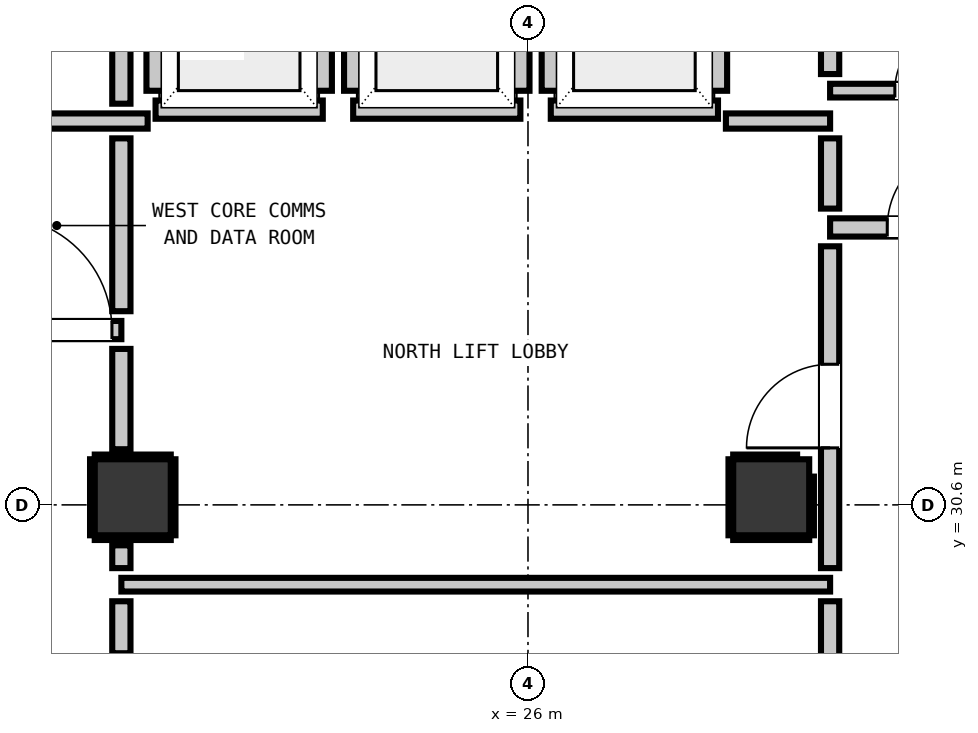
"""IFC4 building model, lengths in metres.
Left out: names, types, materials, properties, quantities, classifications, styles, units other than length and angle.
Written with IfcOpenShell. Run it as: python <this file> out.ifc"""

import sys

from ifc_helpers import new_model, si_unit, direction, frame, frame_2d, origin, origin_2d, place, context, subcontext, project, spatial, rectangle, extrude, element, fill, save


model = new_model("IFC4")
c1 = context("Model", 3, precision=1e-05, world=origin(), true_north=direction((0.0, 1.0)))
c2 = subcontext(c1, "Body", "Model", "MODEL_VIEW")
j1 = project(units=[si_unit("LENGTHUNIT", "METRE"), si_unit("PLANEANGLEUNIT", "RADIAN")], contexts=[c1])
p1 = place(None, origin())
s1 = spatial("IfcSite", under=j1, at=p1, CompositionType="ELEMENT")
p2 = place(p1, origin())
s2 = spatial("IfcBuilding", under=s1, at=p2, CompositionType="ELEMENT")
p3 = place(p2, frame((0.0, 0.0, 31.96)))
s3 = spatial("IfcBuildingStorey", under=s2, at=p3, CompositionType="ELEMENT", Elevation=31.96)
for number, where, z_axis, x_axis in (
    (1, (20.8, 30.7, 0.0), (0.0, 0.0, 1.0), (1.0, 0.0, 0.0)),
    (2, (29.2, 30.7, 0.0), (0.0, 0.0, 1.0), (1.0, 0.0, 0.0)),
):
    element("IfcColumn", number, at=place(p3, frame(where, z_axis=z_axis, x_axis=x_axis)), inside=s3, PredefinedType="COLUMN", context=c2, shape_type="SweptSolid", body=[
        extrude(rectangle(XDim=1.0, YDim=1.0, at=origin_2d()), origin(), (0.0, 0.0, 1.0), 3.32),
    ])
p4 = place(p3, frame((21.1, 35.8, 0.0), z_axis=(0.0, 0.0, 1.0), x_axis=(1.0, 0.0, 0.0)))
e3 = element("IfcWall", 3, at=p4, inside=s3, PredefinedType="PARTITIONING", context=c2, shape_type="SweptSolid", body=[
    extrude(rectangle(XDim=2.2, YDim=0.24, at=frame_2d((1.1, 0.0))), origin(), (0.0, 0.0, 1.0), 3.06),
])
p5 = place(p3, frame((21.1, 36.048, 0.0), z_axis=(0.0, 0.0, 1.0), x_axis=(0.0, 1.0, 0.0)))
e4 = element("IfcWall", 4, at=p5, inside=s3, PredefinedType="PARTITIONING", context=c2, shape_type="SweptSolid", body=[
    extrude(rectangle(XDim=2.104, YDim=0.24, at=frame_2d((1.052, 0.0))), origin(), (0.0, 0.0, 1.0), 2.295),
])
p6 = place(p3, frame((23.3, 36.048, 0.0), z_axis=(0.0, 0.0, 1.0), x_axis=(0.0, 1.0, 0.0)))
e5 = element("IfcWall", 5, at=p6, inside=s3, PredefinedType="PARTITIONING", context=c2, shape_type="SweptSolid", body=[
    extrude(rectangle(XDim=2.104, YDim=0.24, at=frame_2d((1.052, 0.0))), origin(), (0.0, 0.0, 1.0), 3.06),
])
p7 = place(p3, frame((23.7, 35.8, 0.0), z_axis=(0.0, 0.0, 1.0), x_axis=(1.0, 0.0, 0.0)))
e6 = element("IfcWall", 6, at=p7, inside=s3, PredefinedType="PARTITIONING", context=c2, shape_type="SweptSolid", body=[
    extrude(rectangle(XDim=2.2, YDim=0.24, at=frame_2d((1.1, 0.0))), origin(), (0.0, 0.0, 1.0), 3.06),
])
for number, where, z_axis, x_axis in (
    (7, (23.7, 36.048, 0.0), (0.0, 0.0, 1.0), (0.0, 1.0, 0.0)),
    (8, (25.9, 36.048, 0.0), (0.0, 0.0, 1.0), (0.0, 1.0, 0.0)),
):
    element("IfcWall", number, at=place(p3, frame(where, z_axis=z_axis, x_axis=x_axis)), inside=s3, PredefinedType="PARTITIONING", context=c2, shape_type="SweptSolid", body=[
        extrude(rectangle(XDim=2.104, YDim=0.24, at=frame_2d((1.052, 0.0))), origin(), (0.0, 0.0, 1.0), 3.06),
    ])
p8 = place(p3, frame((26.3, 35.8, 0.0), z_axis=(0.0, 0.0, 1.0), x_axis=(1.0, 0.0, 0.0)))
e9 = element("IfcWall", 9, at=p8, inside=s3, PredefinedType="PARTITIONING", context=c2, shape_type="SweptSolid", body=[
    extrude(rectangle(XDim=2.2, YDim=0.24, at=frame_2d((1.1, 0.0))), origin(), (0.0, 0.0, 1.0), 3.06),
])
for number, where, z_axis, x_axis in (
    (10, (26.3, 36.048, 0.0), (0.0, 0.0, 1.0), (0.0, 1.0, 0.0)),
    (11, (28.5, 36.048, 0.0), (0.0, 0.0, 1.0), (0.0, 1.0, 0.0)),
):
    element("IfcWall", number, at=place(p3, frame(where, z_axis=z_axis, x_axis=x_axis)), inside=s3, PredefinedType="PARTITIONING", context=c2, shape_type="SweptSolid", body=[
        extrude(rectangle(XDim=2.104, YDim=0.24, at=frame_2d((1.052, 0.0))), origin(), (0.0, 0.0, 1.0), 3.06),
    ])
p9 = place(p3, frame((17.45, 32.9, 0.0), z_axis=(0.0, 0.0, 1.0), x_axis=(1.0, 0.0, 0.0)))
e12 = element("IfcWall", 12, at=p9, inside=s3, PredefinedType="PARTITIONING", context=c2, shape_type="SweptSolid", body=[
    extrude(rectangle(XDim=3.2, YDim=0.24, at=frame_2d((1.6, 0.0))), origin(), (0.0, 0.0, 1.0), 3.06),
])
p10 = place(p9, frame((0.159, 0.0, 0.0)))
e13 = element("IfcOpeningElement", 13, at=p10, cuts=e12, PredefinedType="OPENING", context=c2, shape_type="SweptSolid", body=[
    extrude(rectangle(XDim=1.1, YDim=2.15, at=frame_2d((0.55, 1.075))), frame((0.0, 0.13, 0.0), z_axis=(0.0, -1.0, 0.0), x_axis=(1.0, 0.0, 0.0)), (0.0, 0.0, 1.0), 0.26),
])
p11 = place(p9, frame((1.576, 0.0, 0.0)))
e14 = element("IfcOpeningElement", 14, at=p11, cuts=e12, PredefinedType="OPENING", context=c2, shape_type="SweptSolid", body=[
    extrude(rectangle(XDim=1.5, YDim=2.15, at=frame_2d((0.75, 1.075))), frame((0.0, 0.13, 0.0), z_axis=(0.0, -1.0, 0.0), x_axis=(1.0, 0.0, 0.0)), (0.0, 0.0, 1.0), 0.26),
])
p12 = place(p3, frame((29.975, 34.25, 0.0), z_axis=(0.0, 0.0, 1.0), x_axis=(1.0, 0.0, 0.0)))
e15 = element("IfcWall", 15, at=p12, inside=s3, PredefinedType="PARTITIONING", context=c2, shape_type="SweptSolid", body=[
    extrude(rectangle(XDim=2.475, YDim=0.24, at=frame_2d((1.237, 0.0))), origin(), (0.0, 0.0, 1.0), 3.06),
])
p13 = place(p12, frame((0.752, 0.0, 0.0)))
e16 = element("IfcOpeningElement", 16, at=p13, cuts=e15, PredefinedType="OPENING", context=c2, shape_type="SweptSolid", body=[
    extrude(rectangle(XDim=1.1, YDim=2.15, at=frame_2d((0.55, 1.075))), frame((0.0, 0.13, 0.0), z_axis=(0.0, -1.0, 0.0), x_axis=(1.0, 0.0, 0.0)), (0.0, 0.0, 1.0), 0.26),
])
p14 = place(p3, frame((18.95, 35.65, 0.0), z_axis=(0.0, 0.0, 1.0), x_axis=(1.0, 0.0, 0.0)))
e17 = element("IfcWall", 17, at=p14, inside=s3, PredefinedType="PARTITIONING", context=c2, shape_type="SweptSolid", body=[
    extrude(rectangle(XDim=2.046, YDim=0.2, at=frame_2d((1.023, 0.0))), origin(), (0.0, 0.0, 1.0), 3.06),
])
p15 = place(p3, frame((28.604, 35.65, 0.0), z_axis=(0.0, 0.0, 1.0), x_axis=(1.0, 0.0, 0.0)))
e18 = element("IfcWall", 18, at=p15, inside=s3, PredefinedType="PARTITIONING", context=c2, shape_type="SweptSolid", body=[
    extrude(rectangle(XDim=1.371, YDim=0.2, at=frame_2d((0.686, 0.0))), origin(), (0.0, 0.0, 1.0), 3.06),
])
p16 = place(p3, frame((20.65, 29.55, 0.0), z_axis=(0.0, 0.0, 1.0), x_axis=(1.0, 0.0, 0.0)))
e19 = element("IfcWall", 19, at=p16, inside=s3, PredefinedType="PARTITIONING", context=c2, shape_type="SweptSolid", body=[
    extrude(rectangle(XDim=9.325, YDim=0.18, at=frame_2d((4.663, 0.0))), origin(), (0.0, 0.0, 1.0), 3.06),
])
p17 = place(p3, frame((29.975, 36.05, 0.0), z_axis=(0.0, 0.0, 1.0), x_axis=(1.0, 0.0, 0.0)))
e20 = element("IfcWall", 20, at=p17, inside=s3, PredefinedType="PARTITIONING", context=c2, shape_type="SweptSolid", body=[
    extrude(rectangle(XDim=2.505, YDim=0.18, at=frame_2d((1.252, 0.0))), origin(), (0.0, 0.0, 1.0), 3.06),
])
p18 = place(p17, frame((0.852, 0.0, 0.0)))
e21 = element("IfcOpeningElement", 21, at=p18, cuts=e20, PredefinedType="OPENING", context=c2, shape_type="SweptSolid", body=[
    extrude(rectangle(XDim=0.9, YDim=2.1, at=frame_2d((0.45, 1.05))), frame((0.0, 0.1, 0.0), z_axis=(0.0, -1.0, 0.0), x_axis=(1.0, 0.0, 0.0)), (0.0, 0.0, 1.0), 0.2),
])
p19 = place(p3, frame((20.65, 28.648, 0.0), z_axis=(0.0, 0.0, 1.0), x_axis=(0.0, 1.0, 0.0)))
e22 = element("IfcWall", 22, at=p19, inside=s3, PredefinedType="PARTITIONING", context=c2, shape_type="SweptSolid", body=[
    extrude(rectangle(XDim=0.684, YDim=0.24, at=frame_2d((0.342, 0.0))), origin(), (0.0, 0.0, 1.0), 2.295),
])
p20 = place(p3, frame((20.65, 29.768, 0.0), z_axis=(0.0, 0.0, 1.0), x_axis=(0.0, 1.0, 0.0)))
e23 = element("IfcWall", 23, at=p20, inside=s3, PredefinedType="PARTITIONING", context=c2, shape_type="SweptSolid", body=[
    extrude(rectangle(XDim=0.3, YDim=0.24, at=frame_2d((0.15, 0.0))), origin(), (0.0, 0.0, 1.0), 2.295),
])
p21 = place(p3, frame((20.65, 31.332, 0.0), z_axis=(0.0, 0.0, 1.0), x_axis=(0.0, 1.0, 0.0)))
e24 = element("IfcWall", 24, at=p21, inside=s3, PredefinedType="PARTITIONING", context=c2, shape_type="SweptSolid", body=[
    extrude(rectangle(XDim=1.32, YDim=0.24, at=frame_2d((0.66, 0.0))), origin(), (0.0, 0.0, 1.0), 2.295),
])
p22 = place(p3, frame((20.65, 33.148, 0.0), z_axis=(0.0, 0.0, 1.0), x_axis=(0.0, 1.0, 0.0)))
e25 = element("IfcWall", 25, at=p22, inside=s3, PredefinedType="PARTITIONING", context=c2, shape_type="SweptSolid", body=[
    extrude(rectangle(XDim=2.274, YDim=0.24, at=frame_2d((1.137, 0.0))), origin(), (0.0, 0.0, 1.0), 2.295),
])
p23 = place(p3, frame((20.65, 35.878, 0.0), z_axis=(0.0, 0.0, 1.0), x_axis=(0.0, 1.0, 0.0)))
e26 = element("IfcWall", 26, at=p23, inside=s3, PredefinedType="PARTITIONING", context=c2, shape_type="SweptSolid", body=[
    extrude(rectangle(XDim=2.674, YDim=0.24, at=frame_2d((1.337, 0.0))), origin(), (0.0, 0.0, 1.0), 2.295),
])
p24 = place(p3, frame((29.975, 25.648, 0.0), z_axis=(0.0, 0.0, 1.0), x_axis=(0.0, 1.0, 0.0)))
e27 = element("IfcWall", 27, at=p24, inside=s3, PredefinedType="PARTITIONING", context=c2, shape_type="SweptSolid", body=[
    extrude(rectangle(XDim=3.684, YDim=0.24, at=frame_2d((1.842, 0.0))), origin(), (0.0, 0.0, 1.0), 3.06),
])
p25 = place(p3, frame((29.975, 29.768, 0.0), z_axis=(0.0, 0.0, 1.0), x_axis=(0.0, 1.0, 0.0)))
e28 = element("IfcWall", 28, at=p25, inside=s3, PredefinedType="PARTITIONING", context=c2, shape_type="SweptSolid", body=[
    extrude(rectangle(XDim=4.234, YDim=0.24, at=frame_2d((2.117, 0.0))), origin(), (0.0, 0.0, 1.0), 3.06),
])
p26 = place(p25, frame((1.582, 0.0, 0.0)))
e29 = element("IfcOpeningElement", 29, at=p26, cuts=e28, PredefinedType="OPENING", context=c2, shape_type="SweptSolid", body=[
    extrude(rectangle(XDim=1.1, YDim=2.15, at=frame_2d((0.55, 1.075))), frame((0.0, 0.13, 0.0), z_axis=(0.0, -1.0, 0.0), x_axis=(1.0, 0.0, 0.0)), (0.0, 0.0, 1.0), 0.26),
])
p27 = place(p3, frame((29.975, 34.498, 0.0), z_axis=(0.0, 0.0, 1.0), x_axis=(0.0, 1.0, 0.0)))
e30 = element("IfcWall", 30, at=p27, inside=s3, PredefinedType="PARTITIONING", context=c2, shape_type="SweptSolid", body=[
    extrude(rectangle(XDim=0.924, YDim=0.24, at=frame_2d((0.462, 0.0))), origin(), (0.0, 0.0, 1.0), 3.06),
])
p28 = place(p3, frame((29.975, 36.268, 0.0), z_axis=(0.0, 0.0, 1.0), x_axis=(0.0, 1.0, 0.0)))
e31 = element("IfcWall", 31, at=p28, inside=s3, PredefinedType="PARTITIONING", context=c2, shape_type="SweptSolid", body=[
    extrude(rectangle(XDim=2.284, YDim=0.24, at=frame_2d((1.142, 0.0))), origin(), (0.0, 0.0, 1.0), 3.06),
])
for number, where, z_axis, x_axis in (
    (32, (20.3, 30.168, 0.0), (0.0, 0.0, 1.0), (1.0, 0.0, 0.0)),
    (33, (20.3, 31.232, 0.0), (0.0, 0.0, 1.0), (1.0, 0.0, 0.0)),
    (34, (20.268, 30.2, 0.0), (0.0, 0.0, 1.0), (0.0, 1.0, 0.0)),
    (35, (21.332, 30.2, 0.0), (0.0, 0.0, 1.0), (0.0, 1.0, 0.0)),
    (36, (28.7, 30.168, 0.0), (0.0, 0.0, 1.0), (1.0, 0.0, 0.0)),
):
    element("IfcWall", number, at=place(p3, frame(where, z_axis=z_axis, x_axis=x_axis)), inside=s3, PredefinedType="PARTITIONING", context=c2, shape_type="SweptSolid", body=[
        extrude(rectangle(XDim=1.0, YDim=0.06, at=frame_2d((0.5, 0.0))), origin(), (0.0, 0.0, 1.0), 1.45),
    ])
p29 = place(p3, frame((28.7, 31.232, 0.0), z_axis=(0.0, 0.0, 1.0), x_axis=(1.0, 0.0, 0.0)))
e37 = element("IfcWall", 37, at=p29, inside=s3, PredefinedType="PARTITIONING", context=c2, shape_type="SweptSolid", body=[
    extrude(rectangle(XDim=0.841, YDim=0.06, at=frame_2d((0.42, 0.0))), origin(), (0.0, 0.0, 1.0), 1.45),
])
p30 = place(p3, frame((28.668, 30.2, 0.0), z_axis=(0.0, 0.0, 1.0), x_axis=(0.0, 1.0, 0.0)))
e38 = element("IfcWall", 38, at=p30, inside=s3, PredefinedType="PARTITIONING", context=c2, shape_type="SweptSolid", body=[
    extrude(rectangle(XDim=1.0, YDim=0.06, at=frame_2d((0.5, 0.0))), origin(), (0.0, 0.0, 1.0), 1.45),
])
p31 = place(p3, frame((29.732, 30.2, 0.0), z_axis=(0.0, 0.0, 1.0), x_axis=(0.0, 1.0, 0.0)))
e39 = element("IfcWall", 39, at=p31, inside=s3, PredefinedType="PARTITIONING", context=c2, shape_type="SweptSolid", body=[
    extrude(rectangle(XDim=0.772, YDim=0.06, at=frame_2d((0.386, 0.0))), origin(), (0.0, 0.0, 1.0), 1.45),
])
p32 = place(p26, origin())
e40 = element("IfcDoor", 40, at=p32, inside=s3, OperationType="SINGLE_SWING_LEFT", PredefinedType="DOOR", context=c2, shape_type="SweptSolid", body=[
    extrude(rectangle(XDim=1.1, YDim=2.15, at=frame_2d((0.55, 1.075))), frame((0.0, 0.025, 0.0), z_axis=(0.0, -1.0, 0.0), x_axis=(1.0, 0.0, 0.0)), (0.0, 0.0, 1.0), 0.05),
])
fill(e29, e40)
p33 = place(p13, origin())
e41 = element("IfcDoor", 41, at=p33, inside=s3, OperationType="SINGLE_SWING_RIGHT", PredefinedType="DOOR", context=c2, shape_type="SweptSolid", body=[
    extrude(rectangle(XDim=1.1, YDim=2.15, at=frame_2d((0.55, 1.075))), frame((0.0, 0.025, 0.0), z_axis=(0.0, -1.0, 0.0), x_axis=(1.0, 0.0, 0.0)), (0.0, 0.0, 1.0), 0.05),
])
fill(e16, e41)
p34 = place(p11, origin())
e42 = element("IfcDoor", 42, at=p34, inside=s3, OperationType="SINGLE_SWING_LEFT", PredefinedType="DOOR", context=c2, shape_type="SweptSolid", body=[
    extrude(rectangle(XDim=1.5, YDim=2.15, at=frame_2d((0.75, 1.075))), frame((0.0, 0.025, 0.0), z_axis=(0.0, -1.0, 0.0), x_axis=(1.0, 0.0, 0.0)), (0.0, 0.0, 1.0), 0.05),
])
fill(e14, e42)
p35 = place(p18, origin())
e43 = element("IfcDoor", 43, at=p35, inside=s3, OperationType="SINGLE_SWING_RIGHT", PredefinedType="DOOR", context=c2, shape_type="SweptSolid", body=[
    extrude(rectangle(XDim=0.9, YDim=2.1, at=frame_2d((0.45, 1.05))), frame((0.0, 0.025, 0.0), z_axis=(0.0, -1.0, 0.0), x_axis=(1.0, 0.0, 0.0)), (0.0, 0.0, 1.0), 0.05),
])
fill(e21, e43)
save(model, sys.argv[1])
